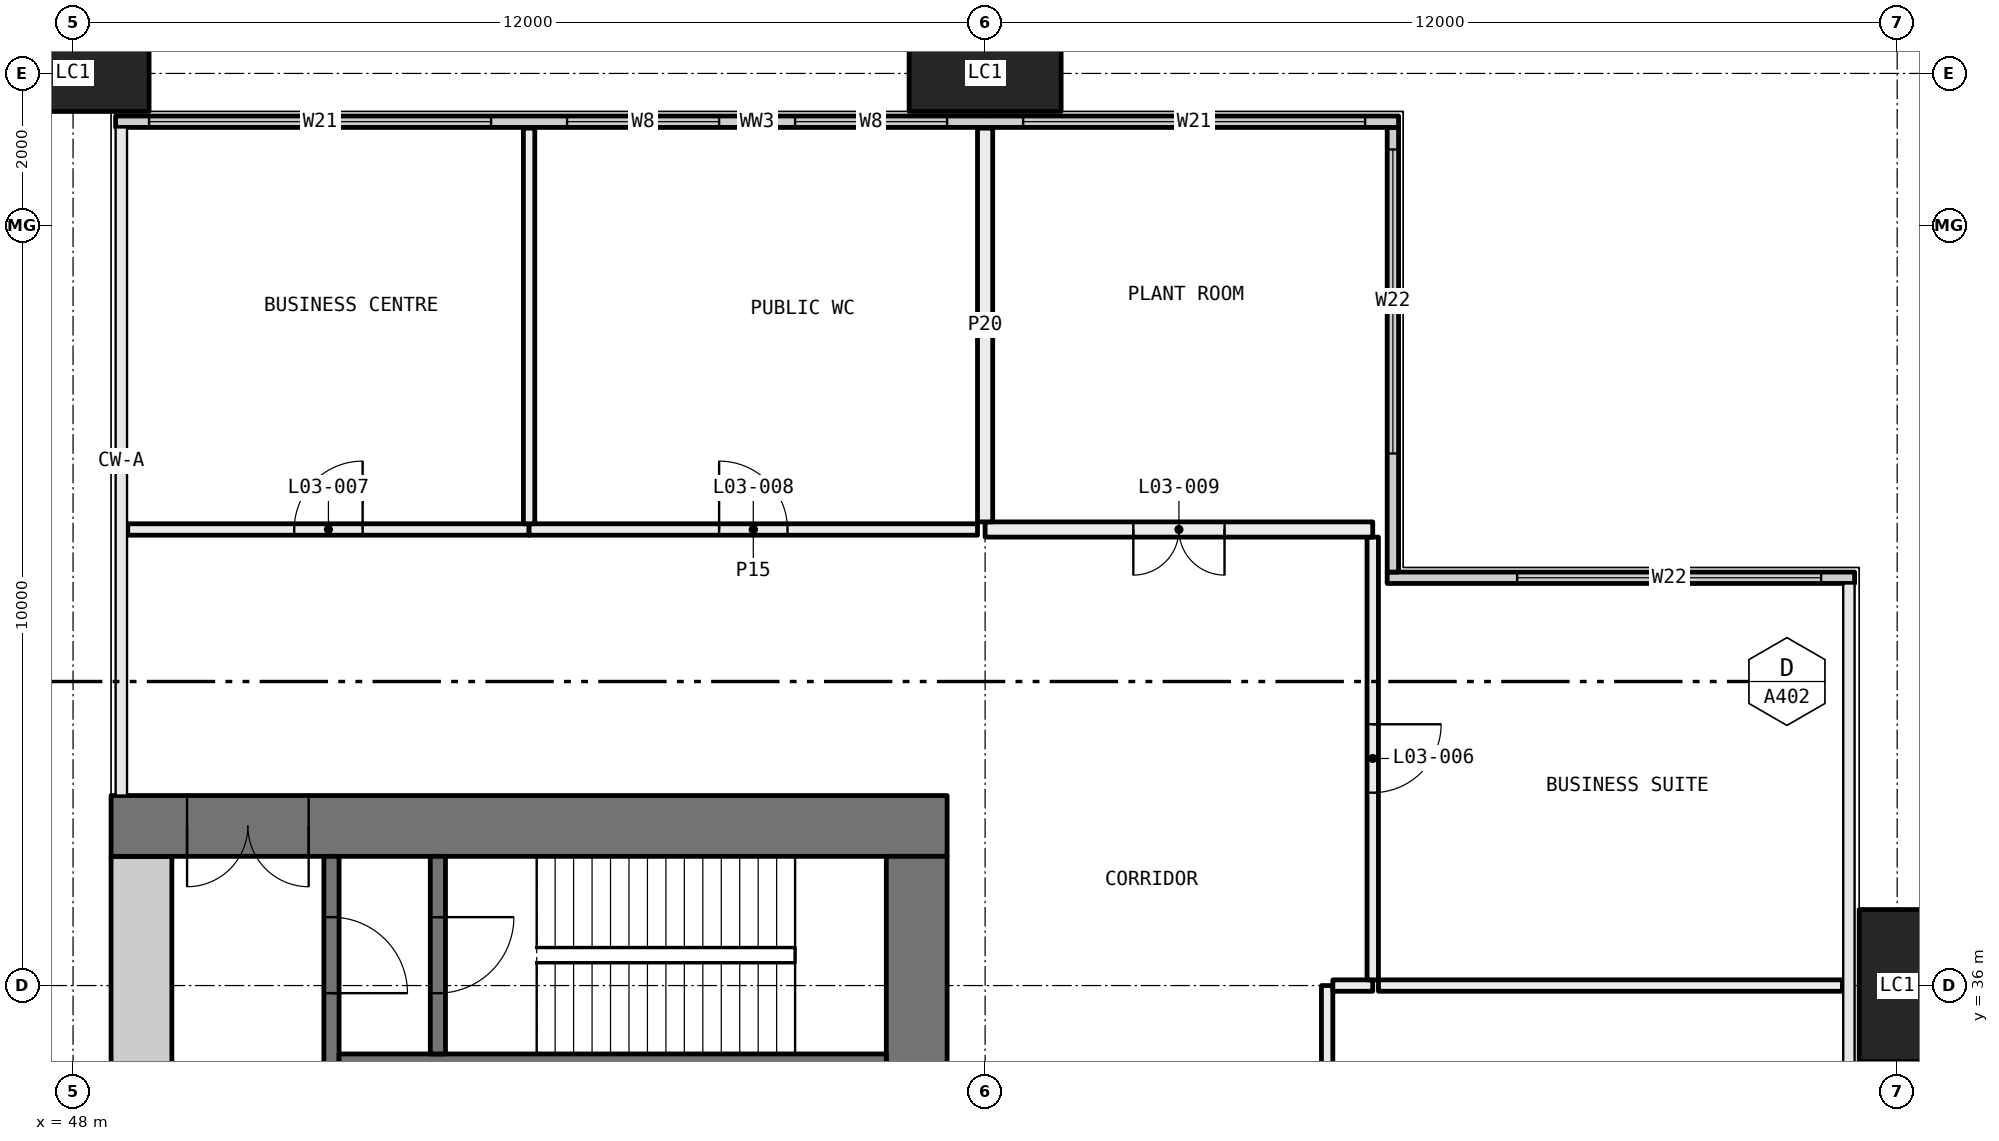
"""IFC4 building model, lengths in metres.
Left out: names, types, materials, properties, quantities, classifications, styles, units other than length and angle.
Written with IfcOpenShell. Run it as: python <this file> out.ifc"""

import sys

from ifc_helpers import new_model, si_unit, direction, frame, frame_2d, origin, origin_2d, place, context, subcontext, project, spatial, rectangle, hollow_rectangle, extrude, element, fill, save


model = new_model("IFC4")
c1 = context("Model", 3, precision=1e-05, world=origin(), true_north=direction((0.0, 1.0)))
c2 = subcontext(c1, "Body", "Model", "MODEL_VIEW")
j1 = project(units=[si_unit("LENGTHUNIT", "METRE"), si_unit("PLANEANGLEUNIT", "RADIAN")], contexts=[c1])
p1 = place(None, origin())
s1 = spatial("IfcSite", under=j1, at=p1, CompositionType="ELEMENT")
p2 = place(p1, origin())
s2 = spatial("IfcBuilding", under=s1, at=p2, CompositionType="ELEMENT")
p3 = place(p2, frame((0.0, 0.0, 18.0)))
s3 = spatial("IfcBuildingStorey", under=s2, at=p3, CompositionType="ELEMENT", Elevation=18.0)
for number, where, z_axis, x_axis in (
    (1, (48.0, 48.0, -0.4), (0.0, 0.0, 1.0), (1.0, 0.0, 0.0)),
    (2, (60.0, 48.0, -0.4), (0.0, 0.0, 1.0), (1.0, 0.0, 0.0)),
    (3, (72.0, 36.0, -0.4), (0.0, 0.0, 1.0), (0.0, 1.0, 0.0)),
):
    element("IfcColumn", number, at=place(p3, frame(where, z_axis=z_axis, x_axis=x_axis)), inside=s3, PredefinedType="COLUMN", context=c2, shape_type="SweptSolid", body=[
        extrude(hollow_rectangle(XDim=2.0, YDim=1.0, WallThickness=0.08, at=origin_2d()), origin(), (0.0, 0.0, 1.0), 6.0),
    ])
p4 = place(p3, frame((65.29, 41.365, 0.0), z_axis=(0.0, 0.0, 1.0), x_axis=(1.0, 0.0, 0.0)))
e4 = element("IfcWall", 4, at=p4, inside=s3, PredefinedType="ELEMENTEDWALL", context=c2, shape_type="SweptSolid", body=[
    extrude(rectangle(XDim=6.15, YDim=0.15, at=frame_2d((3.075, 0.0))), origin(), (0.0, 0.0, 1.0), 5.6),
])
p5 = place(p4, frame((1.71, 0.0, 0.45)))
e5 = element("IfcOpeningElement", 5, at=p5, cuts=e4, PredefinedType="OPENING", context=c2, shape_type="SweptSolid", body=[
    extrude(rectangle(XDim=4.0, YDim=5.1, at=frame_2d((2.0, 2.55))), frame((0.0, 0.085, 0.0), z_axis=(0.0, -1.0, 0.0), x_axis=(1.0, 0.0, 0.0)), (0.0, 0.0, 1.0), 0.17),
])
p6 = place(p3, frame((65.365, 41.44, 0.0), z_axis=(0.0, 0.0, 1.0), x_axis=(0.0, 1.0, 0.0)))
e6 = element("IfcWall", 6, at=p6, inside=s3, PredefinedType="ELEMENTEDWALL", context=c2, shape_type="SweptSolid", body=[
    extrude(rectangle(XDim=5.85, YDim=0.15, at=frame_2d((2.925, 0.0))), origin(), (0.0, 0.0, 1.0), 5.6),
])
p7 = place(p6, frame((1.56, 0.0, 0.45)))
e7 = element("IfcOpeningElement", 7, at=p7, cuts=e6, PredefinedType="OPENING", context=c2, shape_type="SweptSolid", body=[
    extrude(rectangle(XDim=4.0, YDim=5.1, at=frame_2d((2.0, 2.55))), frame((0.0, 0.085, 0.0), z_axis=(0.0, -1.0, 0.0), x_axis=(1.0, 0.0, 0.0)), (0.0, 0.0, 1.0), 0.17),
])
p8 = place(p3, frame((48.56, 47.365, 0.0), z_axis=(0.0, 0.0, 1.0), x_axis=(1.0, 0.0, 0.0)))
e8 = element("IfcWall", 8, at=p8, inside=s3, PredefinedType="ELEMENTEDWALL", context=c2, shape_type="SweptSolid", body=[
    extrude(rectangle(XDim=16.88, YDim=0.15, at=frame_2d((8.44, 0.0))), origin(), (0.0, 0.0, 1.0), 5.6),
])
p9 = place(p8, frame((0.44, 0.0, 0.45)))
e9 = element("IfcOpeningElement", 9, at=p9, cuts=e8, PredefinedType="OPENING", context=c2, shape_type="SweptSolid", body=[
    extrude(rectangle(XDim=4.5, YDim=5.1, at=frame_2d((2.25, 2.55))), frame((0.0, 0.085, 0.0), z_axis=(0.0, -1.0, 0.0), x_axis=(1.0, 0.0, 0.0)), (0.0, 0.0, 1.0), 0.17),
])
p10 = place(p8, frame((5.94, 0.0, 0.45)))
e10 = element("IfcOpeningElement", 10, at=p10, cuts=e8, PredefinedType="OPENING", context=c2, shape_type="SweptSolid", body=[
    extrude(rectangle(XDim=2.0, YDim=5.1, at=frame_2d((1.0, 2.55))), frame((0.0, 0.085, 0.0), z_axis=(0.0, -1.0, 0.0), x_axis=(1.0, 0.0, 0.0)), (0.0, 0.0, 1.0), 0.17),
])
p11 = place(p8, frame((8.94, 0.0, 0.45)))
e11 = element("IfcOpeningElement", 11, at=p11, cuts=e8, PredefinedType="OPENING", context=c2, shape_type="SweptSolid", body=[
    extrude(rectangle(XDim=2.0, YDim=5.1, at=frame_2d((1.0, 2.55))), frame((0.0, 0.085, 0.0), z_axis=(0.0, -1.0, 0.0), x_axis=(1.0, 0.0, 0.0)), (0.0, 0.0, 1.0), 0.17),
])
p12 = place(p8, frame((11.94, 0.0, 0.45)))
e12 = element("IfcOpeningElement", 12, at=p12, cuts=e8, PredefinedType="OPENING", context=c2, shape_type="SweptSolid", body=[
    extrude(rectangle(XDim=4.5, YDim=5.1, at=frame_2d((2.25, 2.55))), frame((0.0, 0.085, 0.0), z_axis=(0.0, -1.0, 0.0), x_axis=(1.0, 0.0, 0.0)), (0.0, 0.0, 1.0), 0.17),
])
p13 = place(p3, frame((64.5, 30.075, 0.0), z_axis=(0.0, 0.0, 1.0), x_axis=(0.0, 1.0, 0.0)))
e13 = element("IfcWall", 13, at=p13, inside=s3, PredefinedType="PARTITIONING", context=c2, shape_type="SweptSolid", body=[
    extrude(rectangle(XDim=5.925, YDim=0.15, at=frame_2d((2.962, 0.0))), origin(), (0.0, 0.0, 1.0), 5.6),
])
p14 = place(p13, frame((2.512, 0.0, 0.0)))
e14 = element("IfcOpeningElement", 14, at=p14, cuts=e13, PredefinedType="OPENING", context=c2, shape_type="SweptSolid", body=[
    extrude(rectangle(XDim=0.9, YDim=2.1, at=frame_2d((0.45, 1.05))), frame((0.0, 0.085, 0.0), z_axis=(0.0, -1.0, 0.0), x_axis=(1.0, 0.0, 0.0)), (0.0, 0.0, 1.0), 0.17),
])
p15 = place(p3, frame((64.575, 36.0, 0.0), z_axis=(0.0, 0.0, 1.0), x_axis=(1.0, 0.0, 0.0)))
e15 = element("IfcWall", 15, at=p15, inside=s3, PredefinedType="PARTITIONING", context=c2, shape_type="SweptSolid", body=[
    extrude(rectangle(XDim=0.525, YDim=0.15, at=frame_2d((0.263, 0.0))), origin(), (0.0, 0.0, 1.0), 5.6),
])
p16 = place(p3, frame((65.1, 36.075, 0.0), z_axis=(0.0, 0.0, 1.0), x_axis=(0.0, 1.0, 0.0)))
e16 = element("IfcWall", 16, at=p16, inside=s3, PredefinedType="PARTITIONING", context=c2, shape_type="SweptSolid", body=[
    extrude(rectangle(XDim=5.825, YDim=0.15, at=frame_2d((2.913, 0.0))), origin(), (0.0, 0.0, 1.0), 5.6),
])
p17 = place(p16, frame((2.462, 0.0, 0.0)))
e17 = element("IfcOpeningElement", 17, at=p17, cuts=e16, PredefinedType="OPENING", context=c2, shape_type="SweptSolid", body=[
    extrude(rectangle(XDim=0.9, YDim=2.1, at=frame_2d((0.45, 1.05))), frame((0.0, 0.085, 0.0), z_axis=(0.0, -1.0, 0.0), x_axis=(1.0, 0.0, 0.0)), (0.0, 0.0, 1.0), 0.17),
])
p18 = place(p3, frame((54.0, 42.0, 0.0), z_axis=(0.0, 0.0, 1.0), x_axis=(-1.0, 0.0, 0.0)))
e18 = element("IfcWall", 18, at=p18, inside=s3, PredefinedType="PARTITIONING", context=c2, shape_type="SweptSolid", body=[
    extrude(rectangle(XDim=5.28, YDim=0.15, at=frame_2d((2.64, 0.0))), origin(), (0.0, 0.0, 1.0), 5.6),
])
p19 = place(p18, frame((2.19, 0.0, 0.0)))
e19 = element("IfcOpeningElement", 19, at=p19, cuts=e18, PredefinedType="OPENING", context=c2, shape_type="SweptSolid", body=[
    extrude(rectangle(XDim=0.9, YDim=2.1, at=frame_2d((0.45, 1.05))), frame((0.0, 0.085, 0.0), z_axis=(0.0, -1.0, 0.0), x_axis=(1.0, 0.0, 0.0)), (0.0, 0.0, 1.0), 0.17),
])
p20 = place(p3, frame((59.9, 42.0, 0.0), z_axis=(0.0, 0.0, 1.0), x_axis=(-1.0, 0.0, 0.0)))
e20 = element("IfcWall", 20, at=p20, inside=s3, PredefinedType="PARTITIONING", context=c2, shape_type="SweptSolid", body=[
    extrude(rectangle(XDim=5.9, YDim=0.15, at=frame_2d((2.95, 0.0))), origin(), (0.0, 0.0, 1.0), 5.6),
])
p21 = place(p20, frame((2.5, 0.0, 0.0)))
e21 = element("IfcOpeningElement", 21, at=p21, cuts=e20, PredefinedType="OPENING", context=c2, shape_type="SweptSolid", body=[
    extrude(rectangle(XDim=0.9, YDim=2.1, at=frame_2d((0.45, 1.05))), frame((0.0, 0.085, 0.0), z_axis=(0.0, -1.0, 0.0), x_axis=(1.0, 0.0, 0.0)), (0.0, 0.0, 1.0), 0.17),
])
p22 = place(p3, frame((65.1, 42.0, 0.0), z_axis=(0.0, 0.0, 1.0), x_axis=(-1.0, 0.0, 0.0)))
e22 = element("IfcWall", 22, at=p22, inside=s3, PredefinedType="PARTITIONING", context=c2, shape_type="SweptSolid", body=[
    extrude(rectangle(XDim=5.1, YDim=0.2, at=frame_2d((2.55, 0.0))), origin(), (0.0, 0.0, 1.0), 5.6),
])
p23 = place(p22, frame((1.95, 0.0, 0.0)))
e23 = element("IfcOpeningElement", 23, at=p23, cuts=e22, PredefinedType="OPENING", context=c2, shape_type="SweptSolid", body=[
    extrude(rectangle(XDim=1.2, YDim=2.1, at=frame_2d((0.6, 1.05))), frame((0.0, 0.11, 0.0), z_axis=(0.0, -1.0, 0.0), x_axis=(1.0, 0.0, 0.0)), (0.0, 0.0, 1.0), 0.22),
])
p24 = place(p3, frame((71.28, 36.0, 0.0), z_axis=(0.0, 0.0, 1.0), x_axis=(-1.0, 0.0, 0.0)))
e24 = element("IfcWall", 24, at=p24, inside=s3, PredefinedType="PARTITIONING", context=c2, shape_type="SweptSolid", body=[
    extrude(rectangle(XDim=6.105, YDim=0.15, at=frame_2d((3.052, 0.0))), origin(), (0.0, 0.0, 1.0), 5.6),
])
p25 = place(p3, frame((54.0, 42.075, 0.0), z_axis=(0.0, 0.0, 1.0), x_axis=(0.0, 1.0, 0.0)))
e25 = element("IfcWall", 25, at=p25, inside=s3, PredefinedType="PARTITIONING", context=c2, shape_type="SweptSolid", body=[
    extrude(rectangle(XDim=5.205, YDim=0.15, at=frame_2d((2.603, 0.0))), origin(), (0.0, 0.0, 1.0), 5.6),
])
p26 = place(p3, frame((60.0, 42.1, 0.0), z_axis=(0.0, 0.0, 1.0), x_axis=(0.0, 1.0, 0.0)))
e26 = element("IfcWall", 26, at=p26, inside=s3, PredefinedType="PARTITIONING", context=c2, shape_type="SweptSolid", body=[
    extrude(rectangle(XDim=5.18, YDim=0.2, at=frame_2d((2.59, 0.0))), origin(), (0.0, 0.0, 1.0), 5.6),
])
p27 = place(p3, frame((59.5, 38.1, 0.0), z_axis=(0.0, 0.0, 1.0), x_axis=(-1.0, 0.0, 0.0)))
e27 = element("IfcWall", 27, at=p27, inside=s3, PredefinedType="SHEAR", context=c2, shape_type="SweptSolid", body=[
    extrude(rectangle(XDim=11.0, YDim=0.8, at=frame_2d((5.5, 0.0))), origin(), (0.0, 0.0, 1.0), 5.6),
])
p28 = place(p27, frame((8.4, 0.0, 0.0)))
e28 = element("IfcOpeningElement", 28, at=p28, cuts=e27, PredefinedType="OPENING", context=c2, shape_type="SweptSolid", body=[
    extrude(rectangle(XDim=1.6, YDim=2.1, at=frame_2d((0.8, 1.05))), frame((0.0, 0.41, 0.0), z_axis=(0.0, -1.0, 0.0), x_axis=(1.0, 0.0, 0.0)), (0.0, 0.0, 1.0), 0.82),
])
p29 = place(p3, frame((59.1, 22.3, 0.0), z_axis=(0.0, 0.0, 1.0), x_axis=(0.0, 1.0, 0.0)))
e29 = element("IfcWall", 29, at=p29, inside=s3, PredefinedType="SHEAR", context=c2, shape_type="SweptSolid", body=[
    extrude(rectangle(XDim=15.4, YDim=0.8, at=frame_2d((7.7, 0.0))), origin(), (0.0, 0.0, 1.0), 5.6),
])
p30 = place(p29, frame((8.15, 0.0, 0.0)))
e30 = element("IfcOpeningElement", 30, at=p30, cuts=e29, PredefinedType="OPENING", context=c2, shape_type="SweptSolid", body=[
    extrude(rectangle(XDim=1.6, YDim=2.1, at=frame_2d((0.8, 1.05))), frame((0.0, 0.41, 0.0), z_axis=(0.0, -1.0, 0.0), x_axis=(1.0, 0.0, 0.0)), (0.0, 0.0, 1.0), 0.82),
])
p31 = place(p29, frame((2.05, 0.0, 0.0)))
e31 = element("IfcOpeningElement", 31, at=p31, cuts=e29, PredefinedType="OPENING", context=c2, shape_type="SweptSolid", body=[
    extrude(rectangle(XDim=1.0, YDim=2.1, at=frame_2d((0.5, 1.05))), frame((0.0, 0.41, 0.0), z_axis=(0.0, -1.0, 0.0), x_axis=(1.0, 0.0, 0.0)), (0.0, 0.0, 1.0), 0.82),
])
p32 = place(p3, frame((48.9, 22.3, 0.0), z_axis=(0.0, 0.0, 1.0), x_axis=(0.0, 1.0, 0.0)))
e32 = element("IfcWall", 32, at=p32, inside=s3, PredefinedType="SHEAR", context=c2, shape_type="SweptSolid", body=[
    extrude(rectangle(XDim=15.4, YDim=0.8, at=frame_2d((7.7, 0.0))), origin(), (0.0, 0.0, 1.0), 5.6),
])
p33 = place(p3, frame((51.4, 25.1, 0.0), z_axis=(0.0, 0.0, 1.0), x_axis=(0.0, 1.0, 0.0)))
e33 = element("IfcWall", 33, at=p33, inside=s3, PredefinedType="SOLIDWALL", context=c2, shape_type="SweptSolid", body=[
    extrude(rectangle(XDim=12.6, YDim=0.2, at=frame_2d((6.3, 0.0))), origin(), (0.0, 0.0, 1.0), 5.6),
])
p34 = place(p33, frame((0.6, 0.0, 0.0)))
e34 = element("IfcOpeningElement", 34, at=p34, cuts=e33, PredefinedType="OPENING", context=c2, shape_type="SweptSolid", body=[
    extrude(rectangle(XDim=1.1, YDim=2.1, at=frame_2d((0.55, 1.05))), frame((0.0, 0.11, 0.0), z_axis=(0.0, -1.0, 0.0), x_axis=(1.0, 0.0, 0.0)), (0.0, 0.0, 1.0), 0.22),
])
p35 = place(p33, frame((10.8, 0.0, 0.0)))
e35 = element("IfcOpeningElement", 35, at=p35, cuts=e33, PredefinedType="OPENING", context=c2, shape_type="SweptSolid", body=[
    extrude(rectangle(XDim=1.0, YDim=2.1, at=frame_2d((0.5, 1.05))), frame((0.0, 0.11, 0.0), z_axis=(0.0, -1.0, 0.0), x_axis=(1.0, 0.0, 0.0)), (0.0, 0.0, 1.0), 0.22),
])
p36 = place(p33, frame((3.875, 0.0, 0.0)))
e36 = element("IfcOpeningElement", 36, at=p36, cuts=e33, PredefinedType="OPENING", context=c2, shape_type="SweptSolid", body=[
    extrude(rectangle(XDim=0.9, YDim=2.1, at=frame_2d((0.45, 1.05))), frame((0.0, 0.11, 0.0), z_axis=(0.0, -1.0, 0.0), x_axis=(1.0, 0.0, 0.0)), (0.0, 0.0, 1.0), 0.22),
])
p37 = place(p33, frame((7.525, 0.0, 0.0)))
e37 = element("IfcOpeningElement", 37, at=p37, cuts=e33, PredefinedType="OPENING", context=c2, shape_type="SweptSolid", body=[
    extrude(rectangle(XDim=0.9, YDim=2.1, at=frame_2d((0.45, 1.05))), frame((0.0, 0.11, 0.0), z_axis=(0.0, -1.0, 0.0), x_axis=(1.0, 0.0, 0.0)), (0.0, 0.0, 1.0), 0.22),
])
p38 = place(p3, frame((58.7, 35.0, 0.0), z_axis=(0.0, 0.0, 1.0), x_axis=(-1.0, 0.0, 0.0)))
e38 = element("IfcWall", 38, at=p38, inside=s3, PredefinedType="SOLIDWALL", context=c2, shape_type="SweptSolid", body=[
    extrude(rectangle(XDim=7.2, YDim=0.2, at=frame_2d((3.6, 0.0))), origin(), (0.0, 0.0, 1.0), 5.6),
])
p39 = place(p3, frame((52.8, 35.1, 0.0), z_axis=(0.0, 0.0, 1.0), x_axis=(0.0, 1.0, 0.0)))
e39 = element("IfcWall", 39, at=p39, inside=s3, PredefinedType="SOLIDWALL", context=c2, shape_type="SweptSolid", body=[
    extrude(rectangle(XDim=2.6, YDim=0.2, at=frame_2d((1.3, 0.0))), origin(), (0.0, 0.0, 1.0), 5.6),
])
p40 = place(p39, frame((0.8, 0.0, 0.0)))
e40 = element("IfcOpeningElement", 40, at=p40, cuts=e39, PredefinedType="OPENING", context=c2, shape_type="SweptSolid", body=[
    extrude(rectangle(XDim=1.0, YDim=2.1, at=frame_2d((0.5, 1.05))), frame((0.0, 0.11, 0.0), z_axis=(0.0, -1.0, 0.0), x_axis=(1.0, 0.0, 0.0)), (0.0, 0.0, 1.0), 0.22),
])
p41 = place(p5, origin())
e41 = element("IfcWindow", 41, at=p41, inside=s3, PartitioningType="SINGLE_PANEL", PredefinedType="WINDOW", context=c2, shape_type="SweptSolid", body=[
    extrude(rectangle(XDim=4.0, YDim=5.1, at=frame_2d((2.0, 2.55))), frame((0.0, 0.03, 0.0), z_axis=(0.0, -1.0, 0.0), x_axis=(1.0, 0.0, 0.0)), (0.0, 0.0, 1.0), 0.06),
])
fill(e5, e41)
p42 = place(p7, origin())
e42 = element("IfcWindow", 42, at=p42, inside=s3, PartitioningType="SINGLE_PANEL", PredefinedType="WINDOW", context=c2, shape_type="SweptSolid", body=[
    extrude(rectangle(XDim=4.0, YDim=5.1, at=frame_2d((2.0, 2.55))), frame((0.0, 0.03, 0.0), z_axis=(0.0, -1.0, 0.0), x_axis=(1.0, 0.0, 0.0)), (0.0, 0.0, 1.0), 0.06),
])
fill(e7, e42)
p43 = place(p9, origin())
e43 = element("IfcWindow", 43, at=p43, inside=s3, PartitioningType="SINGLE_PANEL", PredefinedType="WINDOW", context=c2, shape_type="SweptSolid", body=[
    extrude(rectangle(XDim=4.5, YDim=5.1, at=frame_2d((2.25, 2.55))), frame((0.0, 0.03, 0.0), z_axis=(0.0, -1.0, 0.0), x_axis=(1.0, 0.0, 0.0)), (0.0, 0.0, 1.0), 0.06),
])
fill(e9, e43)
p44 = place(p10, origin())
e44 = element("IfcWindow", 44, at=p44, inside=s3, PartitioningType="SINGLE_PANEL", PredefinedType="WINDOW", context=c2, shape_type="SweptSolid", body=[
    extrude(rectangle(XDim=2.0, YDim=5.1, at=frame_2d((1.0, 2.55))), frame((0.0, 0.03, 0.0), z_axis=(0.0, -1.0, 0.0), x_axis=(1.0, 0.0, 0.0)), (0.0, 0.0, 1.0), 0.06),
])
fill(e10, e44)
p45 = place(p11, origin())
e45 = element("IfcWindow", 45, at=p45, inside=s3, PartitioningType="SINGLE_PANEL", PredefinedType="WINDOW", context=c2, shape_type="SweptSolid", body=[
    extrude(rectangle(XDim=2.0, YDim=5.1, at=frame_2d((1.0, 2.55))), frame((0.0, 0.03, 0.0), z_axis=(0.0, -1.0, 0.0), x_axis=(1.0, 0.0, 0.0)), (0.0, 0.0, 1.0), 0.06),
])
fill(e11, e45)
p46 = place(p12, origin())
e46 = element("IfcWindow", 46, at=p46, inside=s3, PartitioningType="SINGLE_PANEL", PredefinedType="WINDOW", context=c2, shape_type="SweptSolid", body=[
    extrude(rectangle(XDim=4.5, YDim=5.1, at=frame_2d((2.25, 2.55))), frame((0.0, 0.03, 0.0), z_axis=(0.0, -1.0, 0.0), x_axis=(1.0, 0.0, 0.0)), (0.0, 0.0, 1.0), 0.06),
])
fill(e12, e46)
p47 = place(p17, frame((0.9, 0.0, 0.0), x_axis=(-1.0, 0.0, 0.0)))
e47 = element("IfcDoor", 47, at=p47, inside=s3, OperationType="SINGLE_SWING_RIGHT", PredefinedType="DOOR", context=c2, shape_type="SweptSolid", body=[
    extrude(rectangle(XDim=0.9, YDim=2.1, at=frame_2d((0.45, 1.05))), frame((0.0, 0.025, 0.0), z_axis=(0.0, -1.0, 0.0), x_axis=(1.0, 0.0, 0.0)), (0.0, 0.0, 1.0), 0.05),
])
fill(e17, e47)
p48 = place(p19, frame((0.9, 0.0, 0.0), x_axis=(-1.0, 0.0, 0.0)))
e48 = element("IfcDoor", 48, at=p48, inside=s3, OperationType="SINGLE_SWING_LEFT", PredefinedType="DOOR", context=c2, shape_type="SweptSolid", body=[
    extrude(rectangle(XDim=0.9, YDim=2.1, at=frame_2d((0.45, 1.05))), frame((0.0, 0.025, 0.0), z_axis=(0.0, -1.0, 0.0), x_axis=(1.0, 0.0, 0.0)), (0.0, 0.0, 1.0), 0.05),
])
fill(e19, e48)
p49 = place(p21, frame((0.9, 0.0, 0.0), x_axis=(-1.0, 0.0, 0.0)))
e49 = element("IfcDoor", 49, at=p49, inside=s3, OperationType="SINGLE_SWING_RIGHT", PredefinedType="DOOR", context=c2, shape_type="SweptSolid", body=[
    extrude(rectangle(XDim=0.9, YDim=2.1, at=frame_2d((0.45, 1.05))), frame((0.0, 0.025, 0.0), z_axis=(0.0, -1.0, 0.0), x_axis=(1.0, 0.0, 0.0)), (0.0, 0.0, 1.0), 0.05),
])
fill(e21, e49)
p50 = place(p23, origin())
e50 = element("IfcDoor", 50, at=p50, inside=s3, OperationType="DOUBLE_DOOR_SINGLE_SWING", PredefinedType="DOOR", context=c2, shape_type="SweptSolid", body=[
    extrude(rectangle(XDim=1.2, YDim=2.1, at=frame_2d((0.6, 1.05))), frame((0.0, 0.025, 0.0), z_axis=(0.0, -1.0, 0.0), x_axis=(1.0, 0.0, 0.0)), (0.0, 0.0, 1.0), 0.05),
])
fill(e23, e50)
p51 = place(p35, frame((1.0, 0.0, 0.0), x_axis=(-1.0, 0.0, 0.0)))
e51 = element("IfcDoor", 51, at=p51, inside=s3, OperationType="SINGLE_SWING_LEFT", PredefinedType="DOOR", context=c2, shape_type="SweptSolid", body=[
    extrude(rectangle(XDim=1.0, YDim=2.1, at=frame_2d((0.5, 1.05))), frame((0.0, 0.025, 0.0), z_axis=(0.0, -1.0, 0.0), x_axis=(1.0, 0.0, 0.0)), (0.0, 0.0, 1.0), 0.05),
])
fill(e35, e51)
p52 = place(p40, frame((1.0, 0.0, 0.0), x_axis=(-1.0, 0.0, 0.0)))
e52 = element("IfcDoor", 52, at=p52, inside=s3, OperationType="SINGLE_SWING_RIGHT", PredefinedType="DOOR", context=c2, shape_type="SweptSolid", body=[
    extrude(rectangle(XDim=1.0, YDim=2.1, at=frame_2d((0.5, 1.05))), frame((0.0, 0.025, 0.0), z_axis=(0.0, -1.0, 0.0), x_axis=(1.0, 0.0, 0.0)), (0.0, 0.0, 1.0), 0.05),
])
fill(e40, e52)
p53 = place(p28, origin())
e53 = element("IfcDoor", 53, at=p53, inside=s3, OperationType="DOUBLE_DOOR_SINGLE_SWING", PredefinedType="DOOR", context=c2, shape_type="SweptSolid", body=[
    extrude(rectangle(XDim=1.6, YDim=2.1, at=frame_2d((0.8, 1.05))), frame((0.0, 0.025, 0.0), z_axis=(0.0, -1.0, 0.0), x_axis=(1.0, 0.0, 0.0)), (0.0, 0.0, 1.0), 0.05),
])
fill(e28, e53)
save(model, sys.argv[1])
